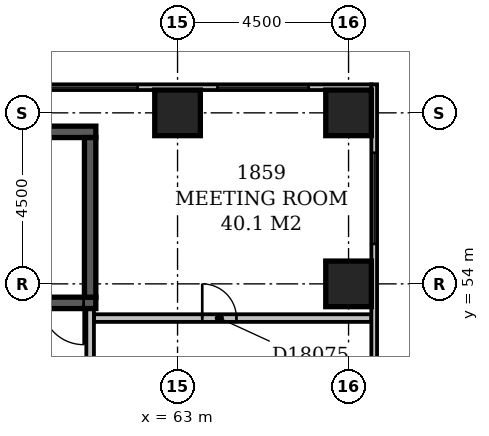
"""IFC4 building model, lengths in metres.
Left out: names, types, materials, properties, quantities, classifications, styles, units other than length and angle.
Written with IfcOpenShell. Run it as: python <this file> out.ifc"""

import sys

from ifc_helpers import new_model, si_unit, direction, frame, frame_2d, origin, origin_2d, place, context, subcontext, project, spatial, rectangle, extrude, element, fill, save


model = new_model("IFC4")
c1 = context("Model", 3, precision=1e-05, world=origin(), true_north=direction((0.0, 1.0)))
c2 = subcontext(c1, "Body", "Model", "MODEL_VIEW")
j1 = project(units=[si_unit("LENGTHUNIT", "METRE"), si_unit("PLANEANGLEUNIT", "RADIAN")], contexts=[c1])
p1 = place(None, origin())
s1 = spatial("IfcSite", under=j1, at=p1, CompositionType="ELEMENT")
p2 = place(p1, origin())
s2 = spatial("IfcBuilding", under=s1, at=p2, CompositionType="ELEMENT")
p3 = place(p2, frame((0.0, 0.0, 75.8)))
s3 = spatial("IfcBuildingStorey", under=s2, at=p3, CompositionType="ELEMENT", Elevation=75.8)
p4 = place(p3, frame((53.85, 53.5, -0.3), z_axis=(0.0, 0.0, 1.0), x_axis=(1.0, 0.0, 0.0)))
e1 = element("IfcWall", 1, at=p4, inside=s3, PredefinedType="SHEAR", context=c2, shape_type="SweptSolid", body=[
    extrude(rectangle(XDim=7.0, YDim=0.3, at=frame_2d((3.5, 0.0))), origin(), (0.0, 0.0, 1.0), 3.6),
])
p5 = place(p4, frame((5.58, 0.0, 0.3)))
e2 = element("IfcOpeningElement", 2, at=p5, cuts=e1, PredefinedType="OPENING", context=c2, shape_type="SweptSolid", body=[
    extrude(rectangle(XDim=1.1, YDim=2.1, at=frame_2d((0.55, 1.05))), frame((0.0, 0.162, 0.0), z_axis=(0.0, -1.0, 0.0), x_axis=(1.0, 0.0, 0.0)), (0.0, 0.0, 1.0), 0.324),
])
p6 = place(p3, frame((53.85, 58.0, -0.3), z_axis=(0.0, 0.0, 1.0), x_axis=(1.0, 0.0, 0.0)))
e3 = element("IfcWall", 3, at=p6, inside=s3, PredefinedType="SHEAR", context=c2, shape_type="SweptSolid", body=[
    extrude(rectangle(XDim=7.0, YDim=0.3, at=frame_2d((3.5, 0.0))), origin(), (0.0, 0.0, 1.0), 3.6),
])
p7 = place(p3, frame((60.7, 53.65, -0.3), z_axis=(0.0, 0.0, 1.0), x_axis=(0.0, 1.0, 0.0)))
e4 = element("IfcWall", 4, at=p7, inside=s3, PredefinedType="SHEAR", context=c2, shape_type="SweptSolid", body=[
    extrude(rectangle(XDim=4.2, YDim=0.3, at=frame_2d((2.1, 0.0))), origin(), (0.0, 0.0, 1.0), 3.6),
])
for number, where, z_axis, x_axis in (
    (5, (67.5, 54.0, -0.3), (0.0, 0.0, 1.0), (1.0, 0.0, 0.0)),
    (6, (63.0, 58.5, -0.3), (0.0, 0.0, 1.0), (1.0, 0.0, 0.0)),
    (7, (67.5, 58.5, -0.3), (0.0, 0.0, 1.0), (1.0, 0.0, 0.0)),
):
    element("IfcColumn", number, at=place(p3, frame(where, z_axis=z_axis, x_axis=x_axis)), inside=s3, PredefinedType="COLUMN", context=c2, shape_type="SweptSolid", body=[
        extrude(rectangle(XDim=1.2, YDim=1.2, at=origin_2d()), origin(), (0.0, 0.0, 1.0), 3.6),
    ])
p8 = place(p3, frame((68.175, 35.4, 0.0), z_axis=(0.0, 0.0, 1.0), x_axis=(0.0, 1.0, 0.0)))
e8 = element("IfcWall", 8, at=p8, inside=s3, PredefinedType="STANDARD", context=c2, shape_type="SweptSolid", body=[
    extrude(rectangle(XDim=23.85, YDim=0.15, at=frame_2d((11.925, 0.0))), origin(), (0.0, 0.0, 1.0), 2.7),
])
p9 = place(p8, frame((1.65, 0.0, 0.6)))
e9 = element("IfcOpeningElement", 9, at=p9, cuts=e8, PredefinedType="OPENING", context=c2, shape_type="SweptSolid", body=[
    extrude(rectangle(XDim=2.4, YDim=1.8, at=frame_2d((1.2, 0.9))), frame((0.0, 0.087, 0.0), z_axis=(0.0, -1.0, 0.0), x_axis=(1.0, 0.0, 0.0)), (0.0, 0.0, 1.0), 0.174),
])
p10 = place(p8, frame((11.49, 0.0, 0.6)))
e10 = element("IfcOpeningElement", 10, at=p10, cuts=e8, PredefinedType="OPENING", context=c2, shape_type="SweptSolid", body=[
    extrude(rectangle(XDim=1.8, YDim=1.8, at=frame_2d((0.9, 0.9))), frame((0.0, 0.087, 0.0), z_axis=(0.0, -1.0, 0.0), x_axis=(1.0, 0.0, 0.0)), (0.0, 0.0, 1.0), 0.174),
])
p11 = place(p8, frame((19.65, 0.0, 0.6)))
e11 = element("IfcOpeningElement", 11, at=p11, cuts=e8, PredefinedType="OPENING", context=c2, shape_type="SweptSolid", body=[
    extrude(rectangle(XDim=2.4, YDim=1.8, at=frame_2d((1.2, 0.9))), frame((0.0, 0.087, 0.0), z_axis=(0.0, -1.0, 0.0), x_axis=(1.0, 0.0, 0.0)), (0.0, 0.0, 1.0), 0.174),
])
p12 = place(p3, frame((68.1, 59.175, 0.0), z_axis=(0.0, 0.0, 1.0), x_axis=(-1.0, 0.0, 0.0)))
e12 = element("IfcWall", 12, at=p12, inside=s3, PredefinedType="STANDARD", context=c2, shape_type="SweptSolid", body=[
    extrude(rectangle(XDim=68.85, YDim=0.15, at=frame_2d((34.425, 0.0))), origin(), (0.0, 0.0, 1.0), 2.7),
])
p13 = place(p12, frame((1.65, 0.0, 0.6)))
e13 = element("IfcOpeningElement", 13, at=p13, cuts=e12, PredefinedType="OPENING", context=c2, shape_type="SweptSolid", body=[
    extrude(rectangle(XDim=2.4, YDim=1.8, at=frame_2d((1.2, 0.9))), frame((0.0, 0.087, 0.0), z_axis=(0.0, -1.0, 0.0), x_axis=(1.0, 0.0, 0.0)), (0.0, 0.0, 1.0), 0.174),
])
p14 = place(p12, frame((6.15, 0.0, 0.6)))
e14 = element("IfcOpeningElement", 14, at=p14, cuts=e12, PredefinedType="OPENING", context=c2, shape_type="SweptSolid", body=[
    extrude(rectangle(XDim=2.4, YDim=1.8, at=frame_2d((1.2, 0.9))), frame((0.0, 0.087, 0.0), z_axis=(0.0, -1.0, 0.0), x_axis=(1.0, 0.0, 0.0)), (0.0, 0.0, 1.0), 0.174),
])
p15 = place(p12, frame((38.49, 0.0, 0.6)))
e15 = element("IfcOpeningElement", 15, at=p15, cuts=e12, PredefinedType="OPENING", context=c2, shape_type="SweptSolid", body=[
    extrude(rectangle(XDim=1.8, YDim=1.8, at=frame_2d((0.9, 0.9))), frame((0.0, 0.087, 0.0), z_axis=(0.0, -1.0, 0.0), x_axis=(1.0, 0.0, 0.0)), (0.0, 0.0, 1.0), 0.174),
])
p16 = place(p3, frame((60.7, 51.6, 0.0), z_axis=(0.0, 0.0, 1.0), x_axis=(0.0, 1.0, 0.0)))
e16 = element("IfcWall", 16, at=p16, inside=s3, PredefinedType="PARTITIONING", context=c2, shape_type="SweptSolid", body=[
    extrude(rectangle(XDim=1.73, YDim=0.2, at=frame_2d((0.865, 0.0))), origin(), (0.0, 0.0, 1.0), 3.3),
])
p17 = place(p3, frame((60.8, 53.1, 0.0), z_axis=(0.0, 0.0, 1.0), x_axis=(1.0, 0.0, 0.0)))
e17 = element("IfcWall", 17, at=p17, inside=s3, PredefinedType="PARTITIONING", context=c2, shape_type="SweptSolid", body=[
    extrude(rectangle(XDim=7.3, YDim=0.2, at=frame_2d((3.65, 0.0))), origin(), (0.0, 0.0, 1.0), 3.3),
])
p18 = place(p17, frame((2.85, 0.0, 0.0)))
e18 = element("IfcOpeningElement", 18, at=p18, cuts=e17, PredefinedType="OPENING", context=c2, shape_type="SweptSolid", body=[
    extrude(rectangle(XDim=0.9, YDim=2.1, at=frame_2d((0.45, 1.05))), frame((0.0, 0.112, 0.0), z_axis=(0.0, -1.0, 0.0), x_axis=(1.0, 0.0, 0.0)), (0.0, 0.0, 1.0), 0.224),
])
p19 = place(p11, origin())
e19 = element("IfcWindow", 19, at=p19, inside=s3, PartitioningType="SINGLE_PANEL", PredefinedType="WINDOW", context=c2, shape_type="SweptSolid", body=[
    extrude(rectangle(XDim=2.4, YDim=1.8, at=frame_2d((1.2, 0.9))), frame((0.0, 0.03, 0.0), z_axis=(0.0, -1.0, 0.0), x_axis=(1.0, 0.0, 0.0)), (0.0, 0.0, 1.0), 0.06),
])
fill(e11, e19)
p20 = place(p13, origin())
e20 = element("IfcWindow", 20, at=p20, inside=s3, PartitioningType="SINGLE_PANEL", PredefinedType="WINDOW", context=c2, shape_type="SweptSolid", body=[
    extrude(rectangle(XDim=2.4, YDim=1.8, at=frame_2d((1.2, 0.9))), frame((0.0, 0.03, 0.0), z_axis=(0.0, -1.0, 0.0), x_axis=(1.0, 0.0, 0.0)), (0.0, 0.0, 1.0), 0.06),
])
fill(e13, e20)
p21 = place(p14, origin())
e21 = element("IfcWindow", 21, at=p21, inside=s3, PartitioningType="SINGLE_PANEL", PredefinedType="WINDOW", context=c2, shape_type="SweptSolid", body=[
    extrude(rectangle(XDim=2.4, YDim=1.8, at=frame_2d((1.2, 0.9))), frame((0.0, 0.03, 0.0), z_axis=(0.0, -1.0, 0.0), x_axis=(1.0, 0.0, 0.0)), (0.0, 0.0, 1.0), 0.06),
])
fill(e14, e21)
p22 = place(p5, origin())
e22 = element("IfcDoor", 22, at=p22, inside=s3, OperationType="SINGLE_SWING_RIGHT", PredefinedType="DOOR", context=c2, shape_type="SweptSolid", body=[
    extrude(rectangle(XDim=1.1, YDim=2.1, at=frame_2d((0.55, 1.05))), frame((0.0, 0.025, 0.0), z_axis=(0.0, -1.0, 0.0), x_axis=(1.0, 0.0, 0.0)), (0.0, 0.0, 1.0), 0.05),
])
fill(e2, e22)
p23 = place(p18, origin())
e23 = element("IfcDoor", 23, at=p23, inside=s3, OperationType="SINGLE_SWING_LEFT", PredefinedType="DOOR", context=c2, shape_type="SweptSolid", body=[
    extrude(rectangle(XDim=0.9, YDim=2.1, at=frame_2d((0.45, 1.05))), frame((0.0, 0.025, 0.0), z_axis=(0.0, -1.0, 0.0), x_axis=(1.0, 0.0, 0.0)), (0.0, 0.0, 1.0), 0.05),
])
fill(e18, e23)
save(model, sys.argv[1])
